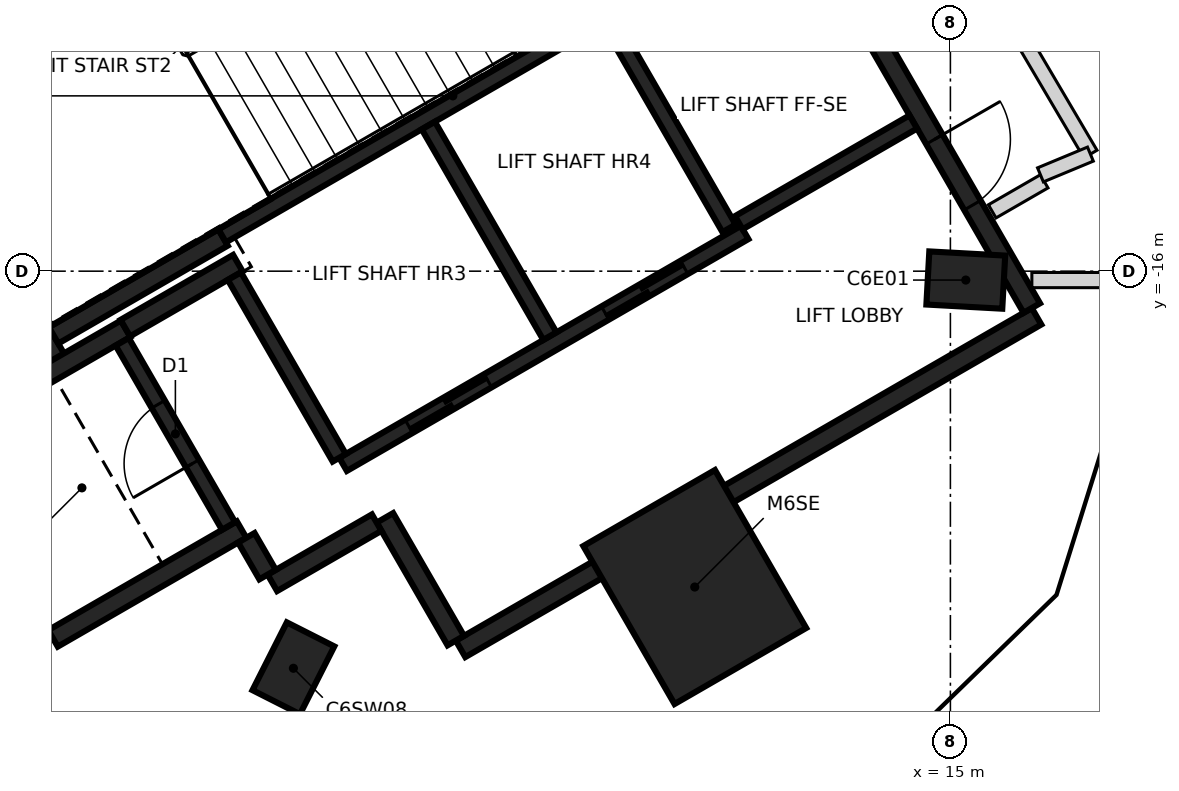
"""IFC4 building model, lengths in metres.
Left out: names, types, materials, properties, quantities, classifications, styles, units other than length and angle.
Written with IfcOpenShell. Run it as: python <this file> out.ifc"""

import sys

from ifc_helpers import new_model, si_unit, direction, frame, frame_2d, origin, origin_2d, place, context, subcontext, project, spatial, rectangle, extrude, element, fill, save


model = new_model("IFC4")
c1 = context("Model", 3, precision=1e-05, world=origin(), true_north=direction((0.0, 1.0)))
c2 = subcontext(c1, "Body", "Model", "MODEL_VIEW")
j1 = project(units=[si_unit("LENGTHUNIT", "METRE"), si_unit("PLANEANGLEUNIT", "RADIAN")], contexts=[c1])
p1 = place(None, origin())
s1 = spatial("IfcSite", under=j1, at=p1, CompositionType="ELEMENT")
p2 = place(p1, origin())
s2 = spatial("IfcBuilding", under=s1, at=p2, CompositionType="ELEMENT")
p3 = place(p2, frame((0.0, 0.0, 280.2)))
s3 = spatial("IfcBuildingStorey", under=s2, at=p3, CompositionType="ELEMENT", Elevation=280.2)
for number, where, z_axis, x_axis in (
    (1, (15.202, -16.117, -0.35), (0.0, 0.0, 1.0), (-0.998, 0.055, 0.0)),
    (2, (6.356, -21.224, -0.35), (0.0, 0.0, 1.0), (0.452, 0.892, 0.0)),
):
    element("IfcColumn", number, at=place(p3, frame(where, z_axis=z_axis, x_axis=x_axis)), inside=s3, PredefinedType="COLUMN", context=c2, shape_type="SweptSolid", body=[
        extrude(rectangle(XDim=1.0, YDim=0.7, at=origin_2d()), origin(), (0.0, 0.0, 1.0), 3.6),
    ])
p4 = place(p3, frame((11.637, -20.155, -0.35), z_axis=(0.0, 0.0, 1.0), x_axis=(-0.5, 0.866025403784, 0.0)))
e3 = element("IfcColumn", 3, at=p4, inside=s3, PredefinedType="COLUMN", context=c2, shape_type="SweptSolid", body=[
    extrude(rectangle(XDim=2.4, YDim=2.0, at=origin_2d()), origin(), (0.0, 0.0, 1.0), 3.6),
])
p5 = place(p3, frame((16.133, -16.594, 0.0), z_axis=(0.0, 0.0, 1.0), x_axis=(-0.866022959057, -0.500004234368, 0.0)))
e4 = element("IfcWall", 4, at=p5, inside=s3, PredefinedType="SHEAR", context=c2, shape_type="SweptSolid", body=[
    extrude(rectangle(XDim=8.75, YDim=0.25, at=frame_2d((4.375, 0.0))), origin(), (0.0, 0.0, 1.0), 3.25),
])
p6 = place(p3, frame((13.008, -11.181, 0.0), z_axis=(0.0, 0.0, 1.0), x_axis=(0.500001955336, -0.866024274868, 0.0)))
e5 = element("IfcWall", 5, at=p6, inside=s3, PredefinedType="SHEAR", context=c2, shape_type="SweptSolid", body=[
    extrude(rectangle(XDim=6.125, YDim=0.25, at=frame_2d((3.062, 0.0))), origin(), (0.0, 0.0, 1.0), 3.25),
])
p7 = place(p6, frame((3.563, 0.0, 0.0)))
e6 = element("IfcOpeningElement", 6, at=p7, cuts=e5, PredefinedType="OPENING", context=c2, shape_type="SweptSolid", body=[
    extrude(rectangle(XDim=1.0, YDim=2.1, at=frame_2d((0.5, 1.05))), frame((0.0, 0.135, 0.0), z_axis=(0.0, -1.0, 0.0), x_axis=(1.0, 0.0, 0.0)), (0.0, 0.0, 1.0), 0.27),
])
p8 = place(p3, frame((3.235, -17.153, 0.0), z_axis=(0.0, 0.0, 1.0), x_axis=(-0.500008851346, 0.866020293397, 0.0)))
e7 = element("IfcWall", 7, at=p8, inside=s3, PredefinedType="SHEAR", context=c2, shape_type="SweptSolid", body=[
    extrude(rectangle(XDim=5.51, YDim=0.25, at=frame_2d((2.755, 0.0))), origin(), (0.0, 0.0, 1.0), 3.25),
])
p9 = place(p3, frame((3.085, -20.894, 0.0), z_axis=(0.0, 0.0, 1.0), x_axis=(-0.499978833458, 0.866037623948, 0.0)))
e8 = element("IfcWall", 8, at=p9, inside=s3, PredefinedType="SHEAR", context=c2, shape_type="SweptSolid", body=[
    extrude(rectangle(XDim=3.05, YDim=0.25, at=frame_2d((1.525, 0.0))), origin(), (0.0, 0.0, 1.0), 3.25),
])
p10 = place(p3, frame((1.669, -18.19, 0.0), z_axis=(0.0, 0.0, 1.0), x_axis=(0.866042235819, 0.499970844928, 0.0)))
e9 = element("IfcWall", 9, at=p10, inside=s3, PredefinedType="SHEAR", context=c2, shape_type="SweptSolid", body=[
    extrude(rectangle(XDim=2.865, YDim=0.25, at=frame_2d((1.432, 0.0))), origin(), (0.0, 0.0, 1.0), 3.25),
])
p11 = place(p3, frame((5.675, -19.399, 0.0), z_axis=(0.0, 0.0, 1.0), x_axis=(-0.866026637627, -0.499997862916, 0.0)))
e10 = element("IfcWall", 10, at=p11, inside=s3, PredefinedType="SHEAR", context=c2, shape_type="SweptSolid", body=[
    extrude(rectangle(XDim=2.865, YDim=0.25, at=frame_2d((1.432, 0.0))), origin(), (0.0, 0.0, 1.0), 3.25),
])
p12 = place(p3, frame((5.431, -15.556, 0.0), z_axis=(0.0, 0.0, 1.0), x_axis=(-0.866022940537, -0.500004266446, 0.0)))
e11 = element("IfcWall", 11, at=p12, inside=s3, PredefinedType="SHEAR", context=c2, shape_type="SweptSolid", body=[
    extrude(rectangle(XDim=2.575, YDim=0.25, at=frame_2d((1.287, 0.0))), origin(), (0.0, 0.0, 1.0), 3.25),
])
p13 = place(p3, frame((8.493, -20.86, 0.0), z_axis=(0.0, 0.0, 1.0), x_axis=(-0.500039802285, 0.866002422705, 0.0)))
e12 = element("IfcWall", 12, at=p13, inside=s3, PredefinedType="SHEAR", context=c2, shape_type="SweptSolid", body=[
    extrude(rectangle(XDim=1.865, YDim=0.25, at=frame_2d((0.932, 0.0))), origin(), (0.0, 0.0, 1.0), 3.25),
])
p14 = place(p3, frame((4.145, -16.749, 0.0), z_axis=(0.0, 0.0, 1.0), x_axis=(0.866038183914, 0.499977863513, 0.0)))
e13 = element("IfcWall", 13, at=p14, inside=s3, PredefinedType="SHEAR", context=c2, shape_type="SweptSolid", body=[
    extrude(rectangle(XDim=1.71, YDim=0.25, at=frame_2d((0.855, 0.0))), origin(), (0.0, 0.0, 1.0), 3.25),
])
p15 = place(p3, frame((7.452, -19.308, 0.0), z_axis=(0.0, 0.0, 1.0), x_axis=(-0.866044474677, -0.49996696679, 0.0)))
e14 = element("IfcWall", 14, at=p15, inside=s3, PredefinedType="SHEAR", context=c2, shape_type="SweptSolid", body=[
    extrude(rectangle(XDim=1.584, YDim=0.25, at=frame_2d((0.792, 0.0))), origin(), (0.0, 0.0, 1.0), 3.25),
])
p16 = place(p3, frame((6.017, -19.992, 0.0), z_axis=(0.0, 0.0, 1.0), x_axis=(-0.500364886717, 0.865814633822, 0.0)))
e15 = element("IfcWall", 15, at=p16, inside=s3, PredefinedType="SHEAR", context=c2, shape_type="SweptSolid", body=[
    extrude(rectangle(XDim=0.559, YDim=0.25, at=frame_2d((0.28, 0.0))), origin(), (0.0, 0.0, 1.0), 3.25),
])
p17 = place(p3, frame((5.419, -15.534, 0.0), z_axis=(0.0, 0.0, 1.0), x_axis=(0.866029065029, 0.499993658486, 0.0)))
e16 = element("IfcWall", 16, at=p17, inside=s3, PredefinedType="SHEAR", context=c2, shape_type="SweptSolid", body=[
    extrude(rectangle(XDim=5.974, YDim=0.2, at=frame_2d((2.987, 0.0))), origin(), (0.0, 0.0, 1.0), 3.25),
])
p18 = place(p3, frame((7.01, -18.542, 0.0), z_axis=(0.0, 0.0, 1.0), x_axis=(0.866030299012, 0.499991521122, 0.0)))
e17 = element("IfcWall", 17, at=p18, inside=s3, PredefinedType="SHEAR", context=c2, shape_type="SweptSolid", body=[
    extrude(rectangle(XDim=6.1, YDim=0.2, at=frame_2d((3.05, 0.0))), origin(), (0.0, 0.0, 1.0), 3.25),
])
p19 = place(p18, frame((1.0, 0.0, 0.0)))
e18 = element("IfcOpeningElement", 18, at=p19, cuts=e17, PredefinedType="OPENING", context=c2, shape_type="SweptSolid", body=[
    extrude(rectangle(XDim=1.2, YDim=2.1, at=frame_2d((0.6, 1.05))), frame((0.0, 0.11, 0.0), z_axis=(0.0, -1.0, 0.0), x_axis=(1.0, 0.0, 0.0)), (0.0, 0.0, 1.0), 0.22),
])
p20 = place(p18, frame((3.982, 0.0, 0.0)))
e19 = element("IfcOpeningElement", 19, at=p20, cuts=e17, PredefinedType="OPENING", context=c2, shape_type="SweptSolid", body=[
    extrude(rectangle(XDim=1.2, YDim=2.1, at=frame_2d((0.6, 1.05))), frame((0.0, 0.11, 0.0), z_axis=(0.0, -1.0, 0.0), x_axis=(1.0, 0.0, 0.0)), (0.0, 0.0, 1.0), 0.22),
])
p21 = place(p3, frame((8.132, -14.084, 0.0), z_axis=(0.0, 0.0, 1.0), x_axis=(0.499997778408, -0.866026686418, 0.0)))
e20 = element("IfcWall", 20, at=p21, inside=s3, PredefinedType="SHEAR", context=c2, shape_type="SweptSolid", body=[
    extrude(rectangle(XDim=3.198, YDim=0.2, at=frame_2d((1.599, 0.0))), origin(), (0.0, 0.0, 1.0), 3.25),
])
p22 = place(p3, frame((5.503, -19.352, 0.0), z_axis=(0.0, 0.0, 1.0), x_axis=(-0.499986818241, 0.866033014143, 0.0)))
e21 = element("IfcWall", 21, at=p22, inside=s3, PredefinedType="SHEAR", context=c2, shape_type="SweptSolid", body=[
    extrude(rectangle(XDim=2.798, YDim=0.2, at=frame_2d((1.399, 0.0))), origin(), (0.0, 0.0, 1.0), 3.25),
])
p23 = place(p22, frame((0.949, 0.0, 0.0)))
e22 = element("IfcOpeningElement", 22, at=p23, cuts=e21, PredefinedType="OPENING", context=c2, shape_type="SweptSolid", body=[
    extrude(rectangle(XDim=0.9, YDim=2.1, at=frame_2d((0.45, 1.05))), frame((0.0, 0.11, 0.0), z_axis=(0.0, -1.0, 0.0), x_axis=(1.0, 0.0, 0.0)), (0.0, 0.0, 1.0), 0.22),
])
p24 = place(p3, frame((6.96, -18.455, 0.0), z_axis=(0.0, 0.0, 1.0), x_axis=(-0.499926705758, 0.866067716099, 0.0)))
e23 = element("IfcWall", 23, at=p24, inside=s3, PredefinedType="SHEAR", context=c2, shape_type="SweptSolid", body=[
    extrude(rectangle(XDim=2.759, YDim=0.2, at=frame_2d((1.38, 0.0))), origin(), (0.0, 0.0, 1.0), 3.25),
])
p25 = place(p3, frame((12.088, -15.437, 0.0), z_axis=(0.0, 0.0, 1.0), x_axis=(-0.500026960575, 0.86600983753, 0.0)))
e24 = element("IfcWall", 24, at=p25, inside=s3, PredefinedType="SHEAR", context=c2, shape_type="SweptSolid", body=[
    extrude(rectangle(XDim=3.1, YDim=0.2, at=frame_2d((1.55, 0.0))), origin(), (0.0, 0.0, 1.0), 3.25),
])
p26 = place(p3, frame((14.512, -14.037, 0.0), z_axis=(0.0, 0.0, 1.0), x_axis=(-0.866018407898, -0.500012117035, 0.0)))
e25 = element("IfcWall", 25, at=p26, inside=s3, PredefinedType="SHEAR", context=c2, shape_type="SweptSolid", body=[
    extrude(rectangle(XDim=2.651, YDim=0.2, at=frame_2d((1.325, 0.0))), origin(), (0.0, 0.0, 1.0), 3.25),
])
p27 = place(p3, frame((15.55, -15.213, 0.0), z_axis=(0.0, 0.0, 1.0), x_axis=(0.865989998118, 0.500061319399, 0.0)))
e26 = element("IfcWall", 26, at=p27, inside=s3, PredefinedType="PARTITIONING", context=c2, shape_type="SweptSolid", body=[
    extrude(rectangle(XDim=0.79, YDim=0.2, at=frame_2d((0.395, 0.0))), origin(), (0.0, 0.0, 1.0), 3.25),
])
p28 = place(p3, frame((15.677, -12.48, 0.0), z_axis=(0.0, 0.0, 1.0), x_axis=(0.507256975253, -0.861794848591, 0.0)))
e27 = element("IfcWall", 27, at=p28, inside=s3, PredefinedType="PARTITIONING", context=c2, shape_type="SweptSolid", body=[
    extrude(rectangle(XDim=2.297, YDim=0.2, at=frame_2d((1.148, 0.0))), origin(), (0.0, 0.0, 1.0), 3.25),
])
p29 = place(p3, frame((16.185, -14.733, 0.0), z_axis=(0.0, 0.0, 1.0), x_axis=(0.923472400107, 0.38366486188, 0.0)))
e28 = element("IfcWall", 28, at=p29, inside=s3, PredefinedType="PARTITIONING", context=c2, shape_type="SweptSolid", body=[
    extrude(rectangle(XDim=0.711, YDim=0.2, at=frame_2d((0.356, 0.0))), origin(), (0.0, 0.0, 1.0), 3.25),
])
p30 = place(p3, frame((16.072, -16.117, 0.0), z_axis=(0.0, 0.0, 1.0), x_axis=(1.0, 0.0, 0.0)))
e29 = element("IfcWall", 29, at=p30, inside=s3, PredefinedType="PARTITIONING", context=c2, shape_type="SweptSolid", body=[
    extrude(rectangle(XDim=1.578, YDim=0.2, at=frame_2d((0.789, 0.0))), origin(), (0.0, 0.0, 1.0), 3.25),
])
p31 = place(p19, origin())
e30 = element("IfcDoor", 30, at=p31, inside=s3, OperationType="DOUBLE_DOOR_SLIDING", PredefinedType="DOOR", context=c2, shape_type="SweptSolid", body=[
    extrude(rectangle(XDim=1.2, YDim=2.1, at=frame_2d((0.6, 1.05))), frame((0.0, 0.025, 0.0), z_axis=(0.0, -1.0, 0.0), x_axis=(1.0, 0.0, 0.0)), (0.0, 0.0, 1.0), 0.05),
])
fill(e18, e30)
p32 = place(p20, origin())
e31 = element("IfcDoor", 31, at=p32, inside=s3, OperationType="DOUBLE_DOOR_SLIDING", PredefinedType="DOOR", context=c2, shape_type="SweptSolid", body=[
    extrude(rectangle(XDim=1.2, YDim=2.1, at=frame_2d((0.6, 1.05))), frame((0.0, 0.025, 0.0), z_axis=(0.0, -1.0, 0.0), x_axis=(1.0, 0.0, 0.0)), (0.0, 0.0, 1.0), 0.05),
])
fill(e19, e31)
p33 = place(p7, origin())
e32 = element("IfcDoor", 32, at=p33, inside=s3, OperationType="SINGLE_SWING_LEFT", PredefinedType="DOOR", context=c2, shape_type="SweptSolid", body=[
    extrude(rectangle(XDim=1.0, YDim=2.1, at=frame_2d((0.5, 1.05))), frame((0.0, 0.025, 0.0), z_axis=(0.0, -1.0, 0.0), x_axis=(1.0, 0.0, 0.0)), (0.0, 0.0, 1.0), 0.05),
])
fill(e6, e32)
p34 = place(p23, origin())
e33 = element("IfcDoor", 33, at=p34, inside=s3, OperationType="SINGLE_SWING_LEFT", PredefinedType="DOOR", context=c2, shape_type="SweptSolid", body=[
    extrude(rectangle(XDim=0.9, YDim=2.1, at=frame_2d((0.45, 1.05))), frame((0.0, 0.025, 0.0), z_axis=(0.0, -1.0, 0.0), x_axis=(1.0, 0.0, 0.0)), (0.0, 0.0, 1.0), 0.05),
])
fill(e22, e33)
save(model, sys.argv[1])
